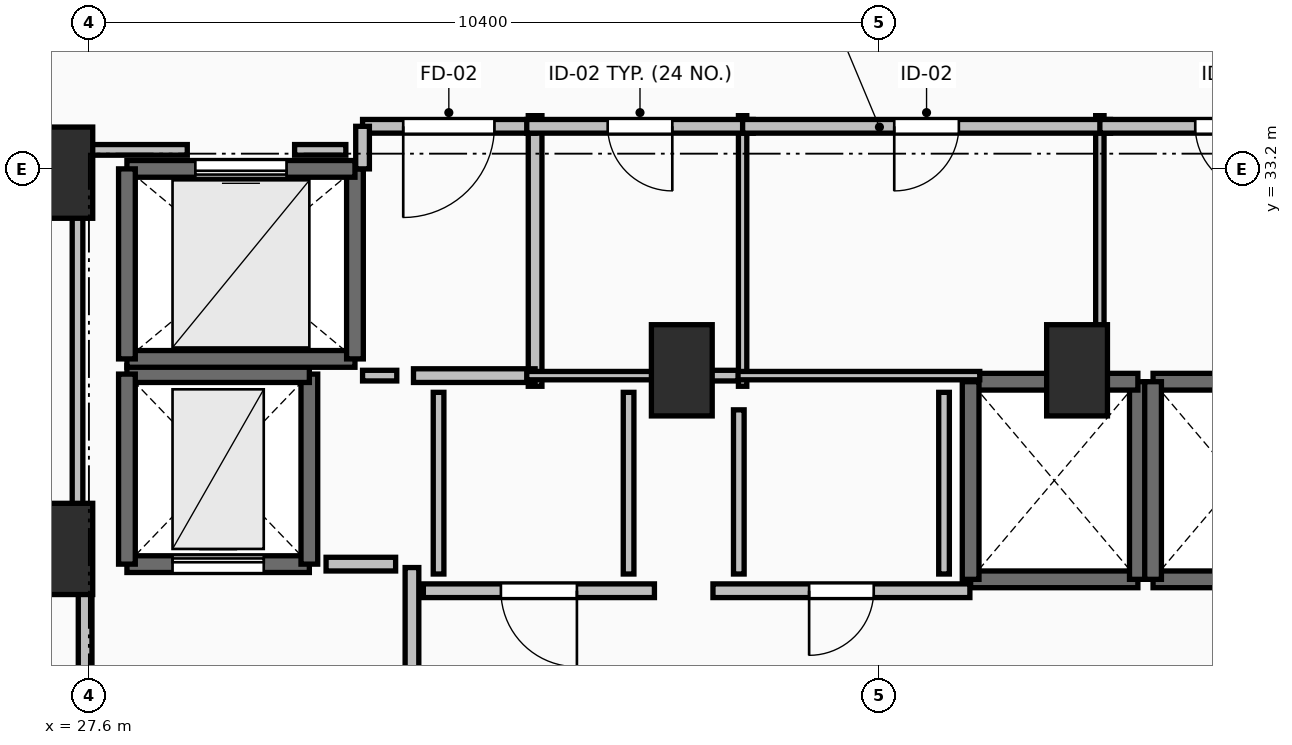
"""IFC4 building model, lengths in metres.
Left out: names, types, materials, properties, quantities, classifications, styles, units other than length and angle.
Written with IfcOpenShell. Run it as: python <this file> out.ifc"""

import sys

from ifc_helpers import new_model, si_unit, direction, frame, frame_2d, origin, origin_2d, place, context, subcontext, project, spatial, rectangle, extrude, element, fill, save


model = new_model("IFC4")
c1 = context("Model", 3, precision=1e-05, world=origin(), true_north=direction((0.0, 1.0)))
c2 = subcontext(c1, "Body", "Model", "MODEL_VIEW")
j1 = project(units=[si_unit("LENGTHUNIT", "METRE"), si_unit("PLANEANGLEUNIT", "RADIAN")], contexts=[c1])
p1 = place(None, origin())
s1 = spatial("IfcSite", under=j1, at=p1, CompositionType="ELEMENT")
p2 = place(p1, origin())
s2 = spatial("IfcBuilding", under=s1, at=p2, CompositionType="ELEMENT")
p3 = place(p2, frame((0.0, 0.0, 143.1)))
s3 = spatial("IfcBuildingStorey", under=s2, at=p3, CompositionType="ELEMENT", Elevation=143.1)
for number, where, z_axis, x_axis in (
    (1, (27.25, 28.2, 0.0), (0.0, 0.0, 1.0), (1.0, 0.0, 0.0)),
    (2, (27.25, 33.15, 0.0), (0.0, 0.0, 1.0), (1.0, 0.0, 0.0)),
    (3, (35.4, 30.55, 0.0), (0.0, 0.0, 1.0), (1.0, 0.0, 0.0)),
    (4, (40.6, 30.55, 0.0), (0.0, 0.0, 1.0), (1.0, 0.0, 0.0)),
):
    element("IfcColumn", number, at=place(p3, frame(where, z_axis=z_axis, x_axis=x_axis)), inside=s3, PredefinedType="PILASTER", context=c2, shape_type="SweptSolid", body=[
        extrude(rectangle(XDim=0.8, YDim=1.2, at=origin_2d()), origin(), (0.0, 0.0, 1.0), 3.5),
    ])
p4 = place(p3, frame((39.2, 27.8, 0.0), z_axis=(0.0, 0.0, 1.0), x_axis=(1.0, 0.0, 0.0)))
e5 = element("IfcWall", 5, at=p4, inside=s3, PredefinedType="SOLIDWALL", context=c2, shape_type="SweptSolid", body=[
    extrude(rectangle(XDim=2.2, YDim=0.22, at=frame_2d((1.1, 0.0))), origin(), (0.0, 0.0, 1.0), 3.24),
])
p5 = place(p3, frame((41.4, 27.8, 0.0), z_axis=(0.0, 0.0, 1.0), x_axis=(0.0, 1.0, 0.0)))
e6 = element("IfcWall", 6, at=p5, inside=s3, PredefinedType="SOLIDWALL", context=c2, shape_type="SweptSolid", body=[
    extrude(rectangle(XDim=2.6, YDim=0.22, at=frame_2d((1.3, 0.0))), origin(), (0.0, 0.0, 1.0), 3.24),
])
p6 = place(p3, frame((41.4, 30.4, 0.0), z_axis=(0.0, 0.0, 1.0), x_axis=(-1.0, 0.0, 0.0)))
e7 = element("IfcWall", 7, at=p6, inside=s3, PredefinedType="SOLIDWALL", context=c2, shape_type="SweptSolid", body=[
    extrude(rectangle(XDim=2.2, YDim=0.22, at=frame_2d((1.1, 0.0))), origin(), (0.0, 0.0, 1.0), 3.24),
])
p7 = place(p3, frame((39.2, 30.4, 0.0), z_axis=(0.0, 0.0, 1.0), x_axis=(0.0, -1.0, 0.0)))
e8 = element("IfcWall", 8, at=p7, inside=s3, PredefinedType="SOLIDWALL", context=c2, shape_type="SweptSolid", body=[
    extrude(rectangle(XDim=2.6, YDim=0.22, at=frame_2d((1.3, 0.0))), origin(), (0.0, 0.0, 1.0), 3.24),
])
for number, where, z_axis, x_axis in (
    (9, (41.6, 27.8, 0.0), (0.0, 0.0, 1.0), (1.0, 0.0, 0.0)),
    (10, (43.8, 30.4, 0.0), (0.0, 0.0, 1.0), (-1.0, 0.0, 0.0)),
):
    element("IfcWall", number, at=place(p3, frame(where, z_axis=z_axis, x_axis=x_axis)), inside=s3, PredefinedType="SOLIDWALL", context=c2, shape_type="SweptSolid", body=[
        extrude(rectangle(XDim=2.2, YDim=0.22, at=frame_2d((1.1, 0.0))), origin(), (0.0, 0.0, 1.0), 3.24),
    ])
p8 = place(p3, frame((41.6, 30.4, 0.0), z_axis=(0.0, 0.0, 1.0), x_axis=(0.0, -1.0, 0.0)))
e11 = element("IfcWall", 11, at=p8, inside=s3, PredefinedType="SOLIDWALL", context=c2, shape_type="SweptSolid", body=[
    extrude(rectangle(XDim=2.6, YDim=0.22, at=frame_2d((1.3, 0.0))), origin(), (0.0, 0.0, 1.0), 3.24),
])
p9 = place(p3, frame((28.1, 28.0, 0.0), z_axis=(0.0, 0.0, 1.0), x_axis=(1.0, 0.0, 0.0)))
e12 = element("IfcWall", 12, at=p9, inside=s3, PredefinedType="SHEAR", context=c2, shape_type="SweptSolid", body=[
    extrude(rectangle(XDim=2.4, YDim=0.22, at=frame_2d((1.2, 0.0))), origin(), (0.0, 0.0, 1.0), 3.24),
])
p10 = place(p9, frame((0.6, 0.0, 0.0)))
e13 = element("IfcOpeningElement", 13, at=p10, cuts=e12, PredefinedType="OPENING", context=c2, shape_type="SweptSolid", body=[
    extrude(rectangle(XDim=1.2, YDim=2.2, at=frame_2d((0.6, 1.1))), frame((0.0, 0.125, 0.0), z_axis=(0.0, -1.0, 0.0), x_axis=(1.0, 0.0, 0.0)), (0.0, 0.0, 1.0), 0.25),
])
p11 = place(p3, frame((30.5, 28.0, 0.0), z_axis=(0.0, 0.0, 1.0), x_axis=(0.0, 1.0, 0.0)))
e14 = element("IfcWall", 14, at=p11, inside=s3, PredefinedType="SHEAR", context=c2, shape_type="SweptSolid", body=[
    extrude(rectangle(XDim=2.5, YDim=0.22, at=frame_2d((1.25, 0.0))), origin(), (0.0, 0.0, 1.0), 3.24),
])
p12 = place(p3, frame((30.5, 30.5, 0.0), z_axis=(0.0, 0.0, 1.0), x_axis=(-1.0, 0.0, 0.0)))
e15 = element("IfcWall", 15, at=p12, inside=s3, PredefinedType="SHEAR", context=c2, shape_type="SweptSolid", body=[
    extrude(rectangle(XDim=2.4, YDim=0.22, at=frame_2d((1.2, 0.0))), origin(), (0.0, 0.0, 1.0), 3.24),
])
p13 = place(p3, frame((28.1, 30.5, 0.0), z_axis=(0.0, 0.0, 1.0), x_axis=(0.0, -1.0, 0.0)))
e16 = element("IfcWall", 16, at=p13, inside=s3, PredefinedType="SHEAR", context=c2, shape_type="SweptSolid", body=[
    extrude(rectangle(XDim=2.5, YDim=0.22, at=frame_2d((1.25, 0.0))), origin(), (0.0, 0.0, 1.0), 3.24),
])
p14 = place(p3, frame((28.1, 30.7, 0.0), z_axis=(0.0, 0.0, 1.0), x_axis=(1.0, 0.0, 0.0)))
e17 = element("IfcWall", 17, at=p14, inside=s3, PredefinedType="SOLIDWALL", context=c2, shape_type="SweptSolid", body=[
    extrude(rectangle(XDim=3.0, YDim=0.22, at=frame_2d((1.5, 0.0))), origin(), (0.0, 0.0, 1.0), 3.24),
])
p15 = place(p3, frame((31.1, 30.7, 0.0), z_axis=(0.0, 0.0, 1.0), x_axis=(0.0, 1.0, 0.0)))
e18 = element("IfcWall", 18, at=p15, inside=s3, PredefinedType="SOLIDWALL", context=c2, shape_type="SweptSolid", body=[
    extrude(rectangle(XDim=2.5, YDim=0.22, at=frame_2d((1.25, 0.0))), origin(), (0.0, 0.0, 1.0), 3.24),
])
p16 = place(p3, frame((31.1, 33.2, 0.0), z_axis=(0.0, 0.0, 1.0), x_axis=(-1.0, 0.0, 0.0)))
e19 = element("IfcWall", 19, at=p16, inside=s3, PredefinedType="SOLIDWALL", context=c2, shape_type="SweptSolid", body=[
    extrude(rectangle(XDim=3.0, YDim=0.22, at=frame_2d((1.5, 0.0))), origin(), (0.0, 0.0, 1.0), 3.24),
])
p17 = place(p16, frame((0.9, 0.0, 0.0)))
e20 = element("IfcOpeningElement", 20, at=p17, cuts=e19, PredefinedType="OPENING", context=c2, shape_type="SweptSolid", body=[
    extrude(rectangle(XDim=1.2, YDim=2.2, at=frame_2d((0.6, 1.1))), frame((0.0, 0.125, 0.0), z_axis=(0.0, -1.0, 0.0), x_axis=(1.0, 0.0, 0.0)), (0.0, 0.0, 1.0), 0.25),
])
p18 = place(p3, frame((28.1, 33.2, 0.0), z_axis=(0.0, 0.0, 1.0), x_axis=(0.0, -1.0, 0.0)))
e21 = element("IfcWall", 21, at=p18, inside=s3, PredefinedType="SOLIDWALL", context=c2, shape_type="SweptSolid", body=[
    extrude(rectangle(XDim=2.5, YDim=0.22, at=frame_2d((1.25, 0.0))), origin(), (0.0, 0.0, 1.0), 3.24),
])
p19 = place(p3, frame((31.85, 24.045, 0.0), z_axis=(0.0, 0.0, 1.0), x_axis=(0.0, 1.0, 0.0)))
e22 = element("IfcWall", 22, at=p19, inside=s3, PredefinedType="PARTITIONING", context=c2, shape_type="SweptSolid", body=[
    extrude(rectangle(XDim=3.91, YDim=0.18, at=frame_2d((1.955, 0.0))), origin(), (0.0, 0.0, 1.0), 3.24),
])
p20 = place(p19, frame((1.355, 0.0, 0.0)))
e23 = element("IfcOpeningElement", 23, at=p20, cuts=e22, PredefinedType="OPENING", context=c2, shape_type="SweptSolid", body=[
    extrude(rectangle(XDim=1.2, YDim=2.15, at=frame_2d((0.6, 1.075))), frame((0.0, 0.105, 0.0), z_axis=(0.0, -1.0, 0.0), x_axis=(1.0, 0.0, 0.0)), (0.0, 0.0, 1.0), 0.21),
])
p21 = place(p3, frame((27.55, 28.0, 0.0), z_axis=(0.0, 0.0, 1.0), x_axis=(0.0, -1.0, 0.0)))
e24 = element("IfcWall", 24, at=p21, inside=s3, PredefinedType="PARTITIONING", context=c2, shape_type="SweptSolid", body=[
    extrude(rectangle(XDim=4.05, YDim=0.18, at=frame_2d((2.025, 0.0))), origin(), (0.0, 0.0, 1.0), 3.24),
])
p22 = place(p21, frame((1.425, 0.0, 0.0)))
e25 = element("IfcOpeningElement", 25, at=p22, cuts=e24, PredefinedType="OPENING", context=c2, shape_type="SweptSolid", body=[
    extrude(rectangle(XDim=1.2, YDim=2.15, at=frame_2d((0.6, 1.075))), frame((0.0, 0.105, 0.0), z_axis=(0.0, -1.0, 0.0), x_axis=(1.0, 0.0, 0.0)), (0.0, 0.0, 1.0), 0.21),
])
p23 = place(p3, frame((33.47, 30.34, 0.0), z_axis=(0.0, 0.0, 1.0), x_axis=(0.0, 1.0, 0.0)))
e26 = element("IfcWall", 26, at=p23, inside=s3, PredefinedType="PARTITIONING", context=c2, shape_type="SweptSolid", body=[
    extrude(rectangle(XDim=3.56, YDim=0.18, at=frame_2d((1.78, 0.0))), origin(), (0.0, 0.0, 1.0), 3.24),
])
p24 = place(p3, frame((31.87, 30.48, 0.0), z_axis=(0.0, 0.0, 1.0), x_axis=(1.0, 0.0, 0.0)))
e27 = element("IfcWall", 27, at=p24, inside=s3, PredefinedType="PARTITIONING", context=c2, shape_type="SweptSolid", body=[
    extrude(rectangle(XDim=1.6, YDim=0.18, at=frame_2d((0.8, 0.0))), origin(), (0.0, 0.0, 1.0), 3.24),
])
p25 = place(p3, frame((33.47, 33.76, 0.0), z_axis=(0.0, 0.0, 1.0), x_axis=(-1.0, 0.0, 0.0)))
e28 = element("IfcWall", 28, at=p25, inside=s3, PredefinedType="PARTITIONING", context=c2, shape_type="SweptSolid", body=[
    extrude(rectangle(XDim=2.27, YDim=0.18, at=frame_2d((1.135, 0.0))), origin(), (0.0, 0.0, 1.0), 3.24),
])
p26 = place(p25, frame((0.535, 0.0, 0.0)))
e29 = element("IfcOpeningElement", 29, at=p26, cuts=e28, PredefinedType="OPENING", context=c2, shape_type="SweptSolid", body=[
    extrude(rectangle(XDim=1.2, YDim=2.15, at=frame_2d((0.6, 1.075))), frame((0.0, 0.105, 0.0), z_axis=(0.0, -1.0, 0.0), x_axis=(1.0, 0.0, 0.0)), (0.0, 0.0, 1.0), 0.21),
])
p27 = place(p3, frame((31.2, 33.76, 0.0), z_axis=(0.0, 0.0, 1.0), x_axis=(0.0, -1.0, 0.0)))
e30 = element("IfcWall", 30, at=p27, inside=s3, PredefinedType="PARTITIONING", context=c2, shape_type="SweptSolid", body=[
    extrude(rectangle(XDim=0.56, YDim=0.18, at=frame_2d((0.28, 0.0))), origin(), (0.0, 0.0, 1.0), 3.24),
])
p28 = place(p3, frame((35.04, 27.65, 0.0), z_axis=(0.0, 0.0, 1.0), x_axis=(-1.0, 0.0, 0.0)))
e31 = element("IfcWall", 31, at=p28, inside=s3, PredefinedType="PARTITIONING", context=c2, shape_type="SweptSolid", body=[
    extrude(rectangle(XDim=3.04, YDim=0.18, at=frame_2d((1.52, 0.0))), origin(), (0.0, 0.0, 1.0), 3.24),
])
p29 = place(p28, frame((1.02, 0.0, 0.0)))
e32 = element("IfcOpeningElement", 32, at=p29, cuts=e31, PredefinedType="OPENING", context=c2, shape_type="SweptSolid", body=[
    extrude(rectangle(XDim=1.0, YDim=2.15, at=frame_2d((0.5, 1.075))), frame((0.0, 0.105, 0.0), z_axis=(0.0, -1.0, 0.0), x_axis=(1.0, 0.0, 0.0)), (0.0, 0.0, 1.0), 0.21),
])
p30 = place(p3, frame((39.19, 27.65, 0.0), z_axis=(0.0, 0.0, 1.0), x_axis=(-1.0, 0.0, 0.0)))
e33 = element("IfcWall", 33, at=p30, inside=s3, PredefinedType="PARTITIONING", context=c2, shape_type="SweptSolid", body=[
    extrude(rectangle(XDim=3.38, YDim=0.18, at=frame_2d((1.69, 0.0))), origin(), (0.0, 0.0, 1.0), 3.24),
])
p31 = place(p30, frame((1.265, 0.0, 0.0)))
e34 = element("IfcOpeningElement", 34, at=p31, cuts=e33, PredefinedType="OPENING", context=c2, shape_type="SweptSolid", body=[
    extrude(rectangle(XDim=0.85, YDim=2.1, at=frame_2d((0.425, 1.05))), frame((0.0, 0.105, 0.0), z_axis=(0.0, -1.0, 0.0), x_axis=(1.0, 0.0, 0.0)), (0.0, 0.0, 1.0), 0.21),
])
p32 = place(p3, frame((36.2, 30.34, 0.0), z_axis=(0.0, 0.0, 1.0), x_axis=(0.0, 1.0, 0.0)))
e35 = element("IfcWall", 35, at=p32, inside=s3, PredefinedType="PARTITIONING", context=c2, shape_type="SweptSolid", body=[
    extrude(rectangle(XDim=3.56, YDim=0.11, at=frame_2d((1.78, 0.0))), origin(), (0.0, 0.0, 1.0), 2.432),
])
p33 = place(p3, frame((33.36, 30.48, 0.0), z_axis=(0.0, 0.0, 1.0), x_axis=(1.0, 0.0, 0.0)))
e36 = element("IfcWall", 36, at=p33, inside=s3, PredefinedType="PARTITIONING", context=c2, shape_type="SweptSolid", body=[
    extrude(rectangle(XDim=1.81, YDim=0.11, at=frame_2d((0.905, 0.0))), origin(), (0.0, 0.0, 1.0), 3.24),
])
p34 = place(p3, frame((36.34, 33.76, 0.0), z_axis=(0.0, 0.0, 1.0), x_axis=(-1.0, 0.0, 0.0)))
e37 = element("IfcWall", 37, at=p34, inside=s3, PredefinedType="PARTITIONING", context=c2, shape_type="SweptSolid", body=[
    extrude(rectangle(XDim=2.98, YDim=0.18, at=frame_2d((1.49, 0.0))), origin(), (0.0, 0.0, 1.0), 3.24),
])
p35 = place(p34, frame((1.065, 0.0, 0.0)))
e38 = element("IfcOpeningElement", 38, at=p35, cuts=e37, PredefinedType="OPENING", context=c2, shape_type="SweptSolid", body=[
    extrude(rectangle(XDim=0.85, YDim=2.1, at=frame_2d((0.425, 1.05))), frame((0.0, 0.105, 0.0), z_axis=(0.0, -1.0, 0.0), x_axis=(1.0, 0.0, 0.0)), (0.0, 0.0, 1.0), 0.21),
])
p36 = place(p3, frame((40.9, 30.34, 0.0), z_axis=(0.0, 0.0, 1.0), x_axis=(0.0, 1.0, 0.0)))
e39 = element("IfcWall", 39, at=p36, inside=s3, PredefinedType="PARTITIONING", context=c2, shape_type="SweptSolid", body=[
    extrude(rectangle(XDim=3.56, YDim=0.11, at=frame_2d((1.78, 0.0))), origin(), (0.0, 0.0, 1.0), 3.24),
])
p37 = place(p3, frame((36.11, 30.48, 0.0), z_axis=(0.0, 0.0, 1.0), x_axis=(1.0, 0.0, 0.0)))
e40 = element("IfcWall", 40, at=p37, inside=s3, PredefinedType="PARTITIONING", context=c2, shape_type="SweptSolid", body=[
    extrude(rectangle(XDim=3.21, YDim=0.11, at=frame_2d((1.605, 0.0))), origin(), (0.0, 0.0, 1.0), 2.432),
])
p38 = place(p3, frame((41.04, 33.76, 0.0), z_axis=(0.0, 0.0, 1.0), x_axis=(-1.0, 0.0, 0.0)))
e41 = element("IfcWall", 41, at=p38, inside=s3, PredefinedType="PARTITIONING", context=c2, shape_type="SweptSolid", body=[
    extrude(rectangle(XDim=4.84, YDim=0.18, at=frame_2d((2.42, 0.0))), origin(), (0.0, 0.0, 1.0), 3.24),
])
p39 = place(p38, frame((1.995, 0.0, 0.0)))
e42 = element("IfcOpeningElement", 42, at=p39, cuts=e41, PredefinedType="OPENING", context=c2, shape_type="SweptSolid", body=[
    extrude(rectangle(XDim=0.85, YDim=2.1, at=frame_2d((0.425, 1.05))), frame((0.0, 0.105, 0.0), z_axis=(0.0, -1.0, 0.0), x_axis=(1.0, 0.0, 0.0)), (0.0, 0.0, 1.0), 0.21),
])
p40 = place(p3, frame((44.26, 33.76, 0.0), z_axis=(0.0, 0.0, 1.0), x_axis=(-1.0, 0.0, 0.0)))
e43 = element("IfcWall", 43, at=p40, inside=s3, PredefinedType="PARTITIONING", context=c2, shape_type="SweptSolid", body=[
    extrude(rectangle(XDim=3.36, YDim=0.18, at=frame_2d((1.68, 0.0))), origin(), (0.0, 0.0, 1.0), 3.24),
])
p41 = place(p40, frame((1.255, 0.0, 0.0)))
e44 = element("IfcOpeningElement", 44, at=p41, cuts=e43, PredefinedType="OPENING", context=c2, shape_type="SweptSolid", body=[
    extrude(rectangle(XDim=0.85, YDim=2.1, at=frame_2d((0.425, 1.05))), frame((0.0, 0.105, 0.0), z_axis=(0.0, -1.0, 0.0), x_axis=(1.0, 0.0, 0.0)), (0.0, 0.0, 1.0), 0.21),
])
p42 = place(p3, frame((31.635, 28.0, 0.0), z_axis=(0.0, 0.0, 1.0), x_axis=(-1.0, 0.0, 0.0)))
e45 = element("IfcWall", 45, at=p42, inside=s3, PredefinedType="PARTITIONING", context=c2, shape_type="SweptSolid", body=[
    extrude(rectangle(XDim=0.915, YDim=0.18, at=frame_2d((0.458, 0.0))), origin(), (0.0, 0.0, 1.0), 3.24),
])
p43 = place(p3, frame((31.2, 30.48, 0.0), z_axis=(0.0, 0.0, 1.0), x_axis=(1.0, 0.0, 0.0)))
e46 = element("IfcWall", 46, at=p43, inside=s3, PredefinedType="PARTITIONING", context=c2, shape_type="SweptSolid", body=[
    extrude(rectangle(XDim=0.45, YDim=0.14, at=frame_2d((0.225, 0.0))), origin(), (0.0, 0.0, 1.0), 3.24),
])
p44 = place(p3, frame((35.14, 30.48, 0.0), z_axis=(0.0, 0.0, 1.0), x_axis=(1.0, 0.0, 0.0)))
e47 = element("IfcWall", 47, at=p44, inside=s3, PredefinedType="PARTITIONING", context=c2, shape_type="SweptSolid", body=[
    extrude(rectangle(XDim=1.0, YDim=0.14, at=frame_2d((0.5, 0.0))), origin(), (0.0, 0.0, 1.0), 2.432),
])
for number, where, z_axis, x_axis in (
    (48, (32.2, 30.26, 0.0), (0.0, 0.0, 1.0), (0.0, -1.0, 0.0)),
    (49, (34.7, 27.87, 0.0), (0.0, 0.0, 1.0), (0.0, 1.0, 0.0)),
):
    element("IfcWall", number, at=place(p3, frame(where, z_axis=z_axis, x_axis=x_axis)), inside=s3, PredefinedType="PARTITIONING", context=c2, shape_type="SweptSolid", body=[
        extrude(rectangle(XDim=2.39, YDim=0.14, at=frame_2d((1.195, 0.0))), origin(), (0.0, 0.0, 1.0), 3.24),
    ])
p45 = place(p3, frame((36.15, 30.03, 0.0), z_axis=(0.0, 0.0, 1.0), x_axis=(0.0, -1.0, 0.0)))
e50 = element("IfcWall", 50, at=p45, inside=s3, PredefinedType="PARTITIONING", context=c2, shape_type="SweptSolid", body=[
    extrude(rectangle(XDim=2.16, YDim=0.14, at=frame_2d((1.08, 0.0))), origin(), (0.0, 0.0, 1.0), 3.24),
])
p46 = place(p3, frame((38.85, 27.87, 0.0), z_axis=(0.0, 0.0, 1.0), x_axis=(0.0, 1.0, 0.0)))
e51 = element("IfcWall", 51, at=p46, inside=s3, PredefinedType="PARTITIONING", context=c2, shape_type="SweptSolid", body=[
    extrude(rectangle(XDim=2.39, YDim=0.14, at=frame_2d((1.195, 0.0))), origin(), (0.0, 0.0, 1.0), 3.24),
])
p47 = place(p3, frame((30.98, 33.45, 0.0), z_axis=(0.0, 0.0, 1.0), x_axis=(-1.0, 0.0, 0.0)))
e52 = element("IfcWall", 52, at=p47, inside=s3, PredefinedType="PARTITIONING", context=c2, shape_type="SweptSolid", body=[
    extrude(rectangle(XDim=0.674, YDim=0.14, at=frame_2d((0.337, 0.0))), origin(), (0.0, 0.0, 1.0), 3.24),
])
p48 = place(p3, frame((28.894, 33.45, 0.0), z_axis=(0.0, 0.0, 1.0), x_axis=(-1.0, 0.0, 0.0)))
e53 = element("IfcWall", 53, at=p48, inside=s3, PredefinedType="PARTITIONING", context=c2, shape_type="SweptSolid", body=[
    extrude(rectangle(XDim=1.444, YDim=0.14, at=frame_2d((0.722, 0.0))), origin(), (0.0, 0.0, 1.0), 2.432),
])
p49 = place(p3, frame((27.45, 33.45, 0.0), z_axis=(0.0, 0.0, 1.0), x_axis=(0.0, -1.0, 0.0)))
e54 = element("IfcWall", 54, at=p49, inside=s3, PredefinedType="PARTITIONING", context=c2, shape_type="SweptSolid", body=[
    extrude(rectangle(XDim=5.254, YDim=0.14, at=frame_2d((2.627, 0.0))), origin(), (0.0, 0.0, 1.0), 2.432),
])
p50 = place(p10, origin())
e55 = element("IfcDoor", 55, at=p50, inside=s3, OperationType="SLIDING_TO_LEFT", PredefinedType="DOOR", context=c2, shape_type="SweptSolid", body=[
    extrude(rectangle(XDim=1.2, YDim=2.2, at=frame_2d((0.6, 1.1))), frame((0.0, 0.025, 0.0), z_axis=(0.0, -1.0, 0.0), x_axis=(1.0, 0.0, 0.0)), (0.0, 0.0, 1.0), 0.05),
])
fill(e13, e55)
p51 = place(p17, origin())
e56 = element("IfcDoor", 56, at=p51, inside=s3, OperationType="SLIDING_TO_LEFT", PredefinedType="DOOR", context=c2, shape_type="SweptSolid", body=[
    extrude(rectangle(XDim=1.2, YDim=2.2, at=frame_2d((0.6, 1.1))), frame((0.0, 0.025, 0.0), z_axis=(0.0, -1.0, 0.0), x_axis=(1.0, 0.0, 0.0)), (0.0, 0.0, 1.0), 0.05),
])
fill(e20, e56)
p52 = place(p26, origin())
e57 = element("IfcDoor", 57, at=p52, inside=s3, OperationType="SINGLE_SWING_RIGHT", PredefinedType="DOOR", context=c2, shape_type="SweptSolid", body=[
    extrude(rectangle(XDim=1.2, YDim=2.15, at=frame_2d((0.6, 1.075))), frame((0.0, 0.025, 0.0), z_axis=(0.0, -1.0, 0.0), x_axis=(1.0, 0.0, 0.0)), (0.0, 0.0, 1.0), 0.05),
])
fill(e29, e57)
p53 = place(p29, origin())
e58 = element("IfcDoor", 58, at=p53, inside=s3, OperationType="SINGLE_SWING_LEFT", PredefinedType="DOOR", context=c2, shape_type="SweptSolid", body=[
    extrude(rectangle(XDim=1.0, YDim=2.15, at=frame_2d((0.5, 1.075))), frame((0.0, 0.025, 0.0), z_axis=(0.0, -1.0, 0.0), x_axis=(1.0, 0.0, 0.0)), (0.0, 0.0, 1.0), 0.05),
])
fill(e32, e58)
p54 = place(p31, origin())
e59 = element("IfcDoor", 59, at=p54, inside=s3, OperationType="SINGLE_SWING_RIGHT", PredefinedType="DOOR", context=c2, shape_type="SweptSolid", body=[
    extrude(rectangle(XDim=0.85, YDim=2.1, at=frame_2d((0.425, 1.05))), frame((0.0, 0.025, 0.0), z_axis=(0.0, -1.0, 0.0), x_axis=(1.0, 0.0, 0.0)), (0.0, 0.0, 1.0), 0.05),
])
fill(e34, e59)
p55 = place(p35, origin())
e60 = element("IfcDoor", 60, at=p55, inside=s3, OperationType="SINGLE_SWING_LEFT", PredefinedType="DOOR", context=c2, shape_type="SweptSolid", body=[
    extrude(rectangle(XDim=0.85, YDim=2.1, at=frame_2d((0.425, 1.05))), frame((0.0, 0.025, 0.0), z_axis=(0.0, -1.0, 0.0), x_axis=(1.0, 0.0, 0.0)), (0.0, 0.0, 1.0), 0.05),
])
fill(e38, e60)
p56 = place(p39, origin())
e61 = element("IfcDoor", 61, at=p56, inside=s3, OperationType="SINGLE_SWING_RIGHT", PredefinedType="DOOR", context=c2, shape_type="SweptSolid", body=[
    extrude(rectangle(XDim=0.85, YDim=2.1, at=frame_2d((0.425, 1.05))), frame((0.0, 0.025, 0.0), z_axis=(0.0, -1.0, 0.0), x_axis=(1.0, 0.0, 0.0)), (0.0, 0.0, 1.0), 0.05),
])
fill(e42, e61)
p57 = place(p41, origin())
e62 = element("IfcDoor", 62, at=p57, inside=s3, OperationType="SINGLE_SWING_LEFT", PredefinedType="DOOR", context=c2, shape_type="SweptSolid", body=[
    extrude(rectangle(XDim=0.85, YDim=2.1, at=frame_2d((0.425, 1.05))), frame((0.0, 0.025, 0.0), z_axis=(0.0, -1.0, 0.0), x_axis=(1.0, 0.0, 0.0)), (0.0, 0.0, 1.0), 0.05),
])
fill(e44, e62)
save(model, sys.argv[1])
